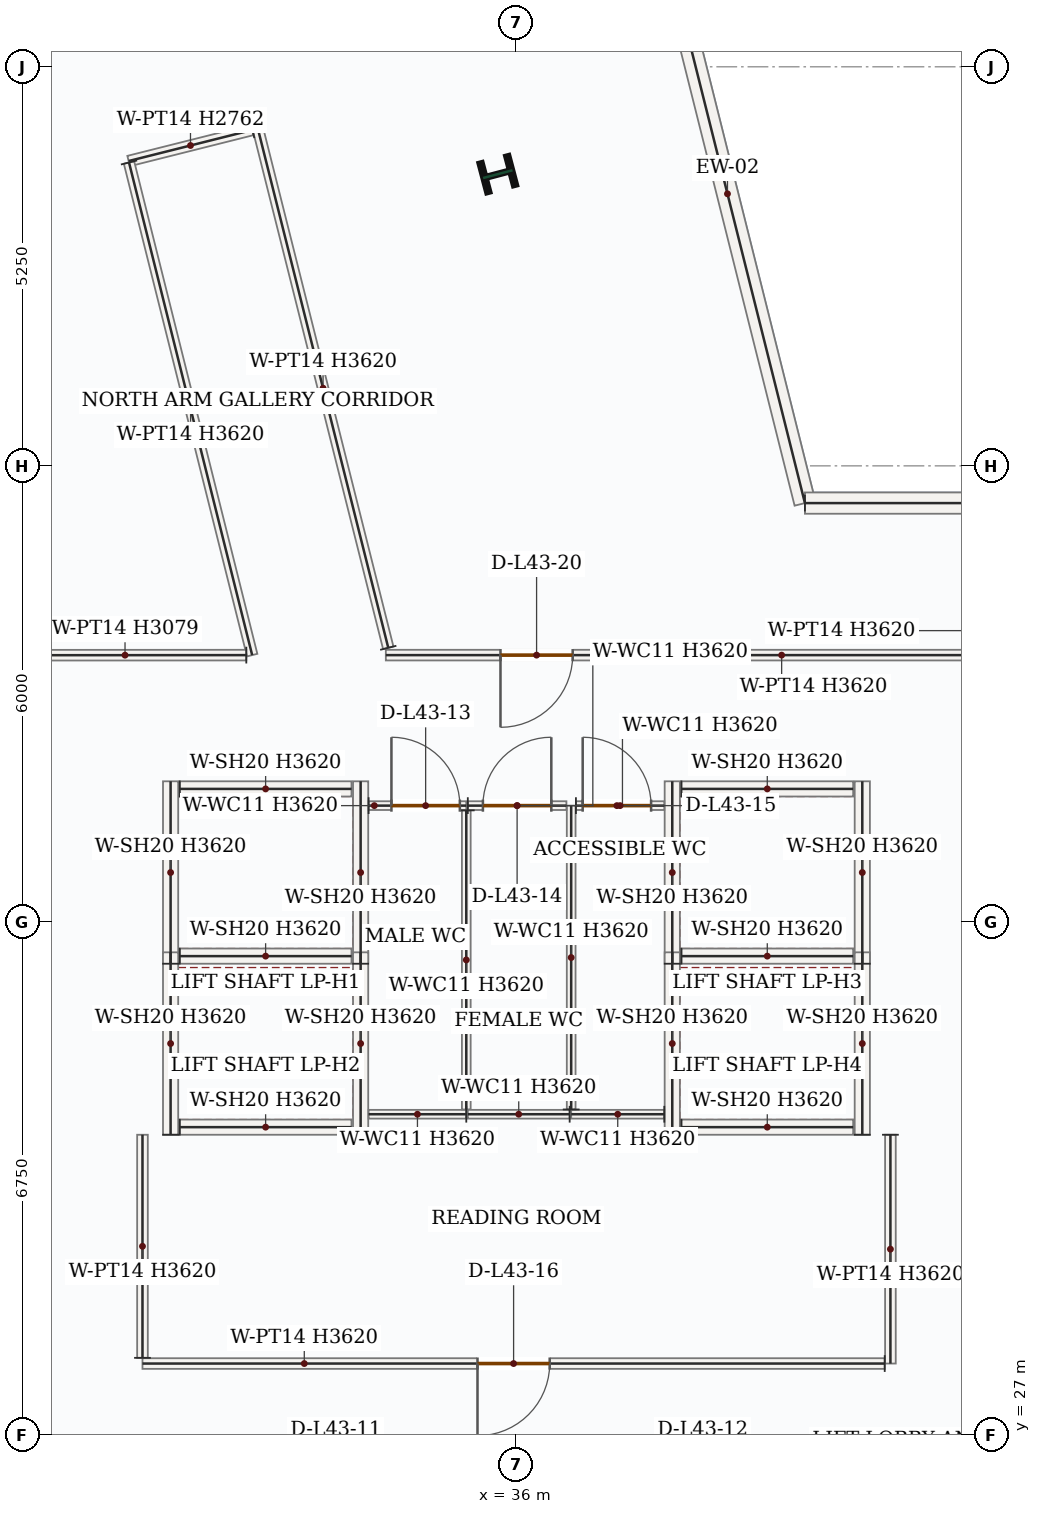
"""IFC4 building model, lengths in metres.
Left out: names, types, materials, properties, quantities, classifications, styles, units other than length and angle.
Written with IfcOpenShell. Run it as: python <this file> out.ifc"""

import sys

from ifc_helpers import new_model, si_unit, direction, frame, frame_2d, origin, origin_2d, place, context, subcontext, project, spatial, rectangle, i_section, extrude, source, transform, mapped, element, fill, save


model = new_model("IFC4")
c1 = context("Model", 3, precision=1e-05, world=origin(), true_north=direction((0.0, 1.0)))
c2 = subcontext(c1, "Body", "Model", "MODEL_VIEW")
j1 = project(units=[si_unit("LENGTHUNIT", "METRE"), si_unit("PLANEANGLEUNIT", "RADIAN")], contexts=[c1])
p1 = place(None, origin())
s1 = spatial("IfcSite", under=j1, at=p1, CompositionType="ELEMENT")
p2 = place(p1, origin())
s2 = spatial("IfcBuilding", under=s1, at=p2, CompositionType="ELEMENT")
p3 = place(p2, frame((0.0, 0.0, 186.3)))
s3 = spatial("IfcBuildingStorey", under=s2, at=p3, CompositionType="ELEMENT", Elevation=186.3)
m1 = source(origin(), c2, "Body", "SweptSolid", [
    extrude(i_section(OverallWidth=0.404, OverallDepth=0.407, WebThickness=0.027, FlangeThickness=0.044, FilletRadius=0.018, at=origin_2d()), origin(), (0.0, 0.0, 1.0), 3.9),
])
p4 = place(p3, frame((35.755, 43.588, 0.0), z_axis=(0.0, 0.0, 1.0), x_axis=(-0.255445757936, 0.966823388604, 0.0)))
e1 = element("IfcColumn", 1, at=p4, inside=s3, PredefinedType="COLUMN", context=c2, shape_type="MappedRepresentation", body=[
    mapped(m1, transform((0.0, 0.0, 0.0), x_axis=(1.0, 0.0, 0.0), y_axis=(0.0, 1.0, 0.0), z_axis=(0.0, 0.0, 1.0), scale=1.0)),
])
m2 = source(origin(), c2, "Body", "SweptSolid", [
    extrude(rectangle(XDim=8.389, YDim=0.28, at=frame_2d((4.195, 0.0))), origin(), (0.0, 0.0, 1.0), 3.62),
])
p5 = place(p3, frame((37.757, 47.398, 0.0), z_axis=(0.0, 0.0, 1.0), x_axis=(0.242939601766, -0.970041416587, 0.0)))
e2 = element("IfcWall", 2, at=p5, inside=s3, PredefinedType="SOLIDWALL", context=c2, shape_type="MappedRepresentation", body=[
    mapped(m2, transform((0.0, 0.0, 0.0), x_axis=(1.0, 0.0, 0.0), y_axis=(0.0, 1.0, 0.0), z_axis=(0.0, 0.0, 1.0), scale=1.0)),
])
m3 = source(origin(), c2, "Body", "SweptSolid", [
    extrude(rectangle(XDim=9.547, YDim=0.28, at=frame_2d((4.773, 0.0))), origin(), (0.0, 0.0, 1.0), 3.62),
])
p6 = place(p3, frame((39.795, 39.26, 0.0), z_axis=(0.0, 0.0, 1.0), x_axis=(1.0, 0.0, 0.0)))
e3 = element("IfcWall", 3, at=p6, inside=s3, PredefinedType="SOLIDWALL", context=c2, shape_type="MappedRepresentation", body=[
    mapped(m3, transform((0.0, 0.0, 0.0), x_axis=(1.0, 0.0, 0.0), y_axis=(0.0, 1.0, 0.0), z_axis=(0.0, 0.0, 1.0), scale=1.0)),
])
m4 = source(origin(), c2, "Body", "SweptSolid", [
    extrude(rectangle(XDim=2.4, YDim=0.2, at=frame_2d((1.2, 0.0))), origin(), (0.0, 0.0, 1.0), 3.62),
])
for number, where, z_axis, x_axis in (
    (4, (31.45, 33.2, 0.0), (0.0, 0.0, 1.0), (0.0, 1.0, 0.0)),
    (5, (33.95, 33.2, 0.0), (0.0, 0.0, 1.0), (0.0, 1.0, 0.0)),
):
    element("IfcWall", number, at=place(p3, frame(where, z_axis=z_axis, x_axis=x_axis)), inside=s3, PredefinedType="SOLIDWALL", context=c2, shape_type="MappedRepresentation", body=[
        mapped(m4, transform((0.0, 0.0, 0.0), x_axis=(1.0, 0.0, 0.0), y_axis=(0.0, 1.0, 0.0), z_axis=(0.0, 0.0, 1.0), scale=1.0)),
    ])
m5 = source(origin(), c2, "Body", "SweptSolid", [
    extrude(rectangle(XDim=2.26, YDim=0.2, at=frame_2d((1.13, 0.0))), origin(), (0.0, 0.0, 1.0), 3.62),
])
for number, where, z_axis, x_axis in (
    (6, (31.57, 33.3, 0.0), (0.0, 0.0, 1.0), (1.0, 0.0, 0.0)),
    (7, (31.57, 35.5, 0.0), (0.0, 0.0, 1.0), (1.0, 0.0, 0.0)),
):
    element("IfcWall", number, at=place(p3, frame(where, z_axis=z_axis, x_axis=x_axis)), inside=s3, PredefinedType="SOLIDWALL", context=c2, shape_type="MappedRepresentation", body=[
        mapped(m5, transform((0.0, 0.0, 0.0), x_axis=(1.0, 0.0, 0.0), y_axis=(0.0, 1.0, 0.0), z_axis=(0.0, 0.0, 1.0), scale=1.0)),
    ])
for number, where, z_axis, x_axis in (
    (8, (31.45, 30.95, 0.0), (0.0, 0.0, 1.0), (0.0, 1.0, 0.0)),
    (9, (33.95, 30.95, 0.0), (0.0, 0.0, 1.0), (0.0, 1.0, 0.0)),
):
    element("IfcWall", number, at=place(p3, frame(where, z_axis=z_axis, x_axis=x_axis)), inside=s3, PredefinedType="SOLIDWALL", context=c2, shape_type="MappedRepresentation", body=[
        mapped(m4, transform((0.0, 0.0, 0.0), x_axis=(1.0, 0.0, 0.0), y_axis=(0.0, 1.0, 0.0), z_axis=(0.0, 0.0, 1.0), scale=1.0)),
    ])
p7 = place(p3, frame((31.57, 31.05, 0.0), z_axis=(0.0, 0.0, 1.0), x_axis=(1.0, 0.0, 0.0)))
e10 = element("IfcWall", 10, at=p7, inside=s3, PredefinedType="SOLIDWALL", context=c2, shape_type="MappedRepresentation", body=[
    mapped(m5, transform((0.0, 0.0, 0.0), x_axis=(1.0, 0.0, 0.0), y_axis=(0.0, 1.0, 0.0), z_axis=(0.0, 0.0, 1.0), scale=1.0)),
])
for number, where, z_axis, x_axis in (
    (11, (38.05, 33.2, 0.0), (0.0, 0.0, 1.0), (0.0, 1.0, 0.0)),
    (12, (40.55, 33.2, 0.0), (0.0, 0.0, 1.0), (0.0, 1.0, 0.0)),
):
    element("IfcWall", number, at=place(p3, frame(where, z_axis=z_axis, x_axis=x_axis)), inside=s3, PredefinedType="SOLIDWALL", context=c2, shape_type="MappedRepresentation", body=[
        mapped(m4, transform((0.0, 0.0, 0.0), x_axis=(1.0, 0.0, 0.0), y_axis=(0.0, 1.0, 0.0), z_axis=(0.0, 0.0, 1.0), scale=1.0)),
    ])
for number, where, z_axis, x_axis in (
    (13, (38.17, 33.3, 0.0), (0.0, 0.0, 1.0), (1.0, 0.0, 0.0)),
    (14, (38.17, 35.5, 0.0), (0.0, 0.0, 1.0), (1.0, 0.0, 0.0)),
):
    element("IfcWall", number, at=place(p3, frame(where, z_axis=z_axis, x_axis=x_axis)), inside=s3, PredefinedType="SOLIDWALL", context=c2, shape_type="MappedRepresentation", body=[
        mapped(m5, transform((0.0, 0.0, 0.0), x_axis=(1.0, 0.0, 0.0), y_axis=(0.0, 1.0, 0.0), z_axis=(0.0, 0.0, 1.0), scale=1.0)),
    ])
for number, where, z_axis, x_axis in (
    (15, (38.05, 30.95, 0.0), (0.0, 0.0, 1.0), (0.0, 1.0, 0.0)),
    (16, (40.55, 30.95, 0.0), (0.0, 0.0, 1.0), (0.0, 1.0, 0.0)),
):
    element("IfcWall", number, at=place(p3, frame(where, z_axis=z_axis, x_axis=x_axis)), inside=s3, PredefinedType="SOLIDWALL", context=c2, shape_type="MappedRepresentation", body=[
        mapped(m4, transform((0.0, 0.0, 0.0), x_axis=(1.0, 0.0, 0.0), y_axis=(0.0, 1.0, 0.0), z_axis=(0.0, 0.0, 1.0), scale=1.0)),
    ])
p8 = place(p3, frame((38.17, 31.05, 0.0), z_axis=(0.0, 0.0, 1.0), x_axis=(1.0, 0.0, 0.0)))
e17 = element("IfcWall", 17, at=p8, inside=s3, PredefinedType="SOLIDWALL", context=c2, shape_type="MappedRepresentation", body=[
    mapped(m5, transform((0.0, 0.0, 0.0), x_axis=(1.0, 0.0, 0.0), y_axis=(0.0, 1.0, 0.0), z_axis=(0.0, 0.0, 1.0), scale=1.0)),
])
m6 = source(origin(), c2, "Body", "SweptSolid", [
    extrude(rectangle(XDim=1.225, YDim=0.115, at=frame_2d((0.613, 0.0))), origin(), (0.0, 0.0, 1.0), 3.62),
])
p9 = place(p3, frame((37.945, 31.22, 0.0), z_axis=(0.0, 0.0, 1.0), x_axis=(-1.0, 0.0, 0.0)))
e18 = element("IfcWall", 18, at=p9, inside=s3, PredefinedType="PARTITIONING", context=c2, shape_type="MappedRepresentation", body=[
    mapped(m6, transform((0.0, 0.0, 0.0), x_axis=(1.0, 0.0, 0.0), y_axis=(0.0, 1.0, 0.0), z_axis=(0.0, 0.0, 1.0), scale=1.0)),
])
m7 = source(origin(), c2, "Body", "SweptSolid", [
    extrude(rectangle(XDim=3.998, YDim=0.115, at=frame_2d((1.999, 0.0))), origin(), (0.0, 0.0, 1.0), 3.62),
])
p10 = place(p3, frame((36.72, 31.282, 0.0), z_axis=(0.0, 0.0, 1.0), x_axis=(0.0, 1.0, 0.0)))
e19 = element("IfcWall", 19, at=p10, inside=s3, PredefinedType="PARTITIONING", context=c2, shape_type="MappedRepresentation", body=[
    mapped(m7, transform((0.0, 0.0, 0.0), x_axis=(1.0, 0.0, 0.0), y_axis=(0.0, 1.0, 0.0), z_axis=(0.0, 0.0, 1.0), scale=1.0)),
])
p11 = place(p3, frame((36.782, 35.28, 0.0), z_axis=(0.0, 0.0, 1.0), x_axis=(1.0, 0.0, 0.0)))
e20 = element("IfcWall", 20, at=p11, inside=s3, PredefinedType="PARTITIONING", context=c2, shape_type="SweptSolid", body=[
    extrude(rectangle(XDim=1.163, YDim=0.115, at=frame_2d((0.581, 0.0))), origin(), (0.0, 0.0, 1.0), 3.62),
])
p12 = place(p11, frame((0.089, 0.0, 0.0)))
e21 = element("IfcOpeningElement", 21, at=p12, cuts=e20, PredefinedType="OPENING", context=c2, shape_type="SweptSolid", body=[
    extrude(rectangle(XDim=0.9, YDim=2.1, at=frame_2d((0.45, 1.05))), frame((0.0, 0.067, 0.0), z_axis=(0.0, -1.0, 0.0), x_axis=(1.0, 0.0, 0.0)), (0.0, 0.0, 1.0), 0.135),
])
m8 = source(origin(), c2, "Body", "SweptSolid", [
    extrude(rectangle(XDim=1.285, YDim=0.115, at=frame_2d((0.643, 0.0))), origin(), (0.0, 0.0, 1.0), 3.62),
])
p13 = place(p3, frame((35.34, 31.22, 0.0), z_axis=(0.0, 0.0, 1.0), x_axis=(-1.0, 0.0, 0.0)))
e22 = element("IfcWall", 22, at=p13, inside=s3, PredefinedType="PARTITIONING", context=c2, shape_type="MappedRepresentation", body=[
    mapped(m8, transform((0.0, 0.0, 0.0), x_axis=(1.0, 0.0, 0.0), y_axis=(0.0, 1.0, 0.0), z_axis=(0.0, 0.0, 1.0), scale=1.0)),
])
p14 = place(p3, frame((34.055, 35.28, 0.0), z_axis=(0.0, 0.0, 1.0), x_axis=(1.0, 0.0, 0.0)))
e23 = element("IfcWall", 23, at=p14, inside=s3, PredefinedType="PARTITIONING", context=c2, shape_type="SweptSolid", body=[
    extrude(rectangle(XDim=1.285, YDim=0.115, at=frame_2d((0.643, 0.0))), origin(), (0.0, 0.0, 1.0), 3.62),
])
p15 = place(p14, frame((0.3, 0.0, 0.0)))
e24 = element("IfcOpeningElement", 24, at=p15, cuts=e23, PredefinedType="OPENING", context=c2, shape_type="SweptSolid", body=[
    extrude(rectangle(XDim=0.9, YDim=2.1, at=frame_2d((0.45, 1.05))), frame((0.0, 0.067, 0.0), z_axis=(0.0, -1.0, 0.0), x_axis=(1.0, 0.0, 0.0)), (0.0, 0.0, 1.0), 0.135),
])
m9 = source(origin(), c2, "Body", "SweptSolid", [
    extrude(rectangle(XDim=3.935, YDim=0.115, at=frame_2d((1.968, 0.0))), origin(), (0.0, 0.0, 1.0), 3.62),
])
p16 = place(p3, frame((35.34, 35.218, 0.0), z_axis=(0.0, 0.0, 1.0), x_axis=(0.0, -1.0, 0.0)))
e25 = element("IfcWall", 25, at=p16, inside=s3, PredefinedType="PARTITIONING", context=c2, shape_type="MappedRepresentation", body=[
    mapped(m9, transform((0.0, 0.0, 0.0), x_axis=(1.0, 0.0, 0.0), y_axis=(0.0, 1.0, 0.0), z_axis=(0.0, 0.0, 1.0), scale=1.0)),
])
m10 = source(origin(), c2, "Body", "SweptSolid", [
    extrude(rectangle(XDim=1.34, YDim=0.115, at=frame_2d((0.67, 0.0))), origin(), (0.0, 0.0, 1.0), 3.62),
])
p17 = place(p3, frame((36.7, 31.22, 0.0), z_axis=(0.0, 0.0, 1.0), x_axis=(-1.0, 0.0, 0.0)))
e26 = element("IfcWall", 26, at=p17, inside=s3, PredefinedType="PARTITIONING", context=c2, shape_type="MappedRepresentation", body=[
    mapped(m10, transform((0.0, 0.0, 0.0), x_axis=(1.0, 0.0, 0.0), y_axis=(0.0, 1.0, 0.0), z_axis=(0.0, 0.0, 1.0), scale=1.0)),
])
p18 = place(p3, frame((35.36, 35.28, 0.0), z_axis=(0.0, 0.0, 1.0), x_axis=(1.0, 0.0, 0.0)))
e27 = element("IfcWall", 27, at=p18, inside=s3, PredefinedType="PARTITIONING", context=c2, shape_type="SweptSolid", body=[
    extrude(rectangle(XDim=1.297, YDim=0.115, at=frame_2d((0.649, 0.0))), origin(), (0.0, 0.0, 1.0), 3.62),
])
p19 = place(p18, frame((0.199, 0.0, 0.0)))
e28 = element("IfcOpeningElement", 28, at=p19, cuts=e27, PredefinedType="OPENING", context=c2, shape_type="SweptSolid", body=[
    extrude(rectangle(XDim=0.9, YDim=2.1, at=frame_2d((0.45, 1.05))), frame((0.0, 0.067, 0.0), z_axis=(0.0, -1.0, 0.0), x_axis=(1.0, 0.0, 0.0)), (0.0, 0.0, 1.0), 0.135),
])
m11 = source(origin(), c2, "Body", "SweptSolid", [
    extrude(rectangle(XDim=3.01, YDim=0.14, at=frame_2d((1.505, 0.0))), origin(), (0.0, 0.0, 1.0), 3.62),
])
p20 = place(p3, frame((40.92, 30.95, 0.0), z_axis=(0.0, 0.0, 1.0), x_axis=(0.0, -1.0, 0.0)))
e29 = element("IfcWall", 29, at=p20, inside=s3, PredefinedType="PARTITIONING", context=c2, shape_type="MappedRepresentation", body=[
    mapped(m11, transform((0.0, 0.0, 0.0), x_axis=(1.0, 0.0, 0.0), y_axis=(0.0, 1.0, 0.0), z_axis=(0.0, 0.0, 1.0), scale=1.0)),
])
p21 = place(p3, frame((40.845, 27.94, 0.0), z_axis=(0.0, 0.0, 1.0), x_axis=(-1.0, 0.0, 0.0)))
e30 = element("IfcWall", 30, at=p21, inside=s3, PredefinedType="PARTITIONING", context=c2, shape_type="SweptSolid", body=[
    extrude(rectangle(XDim=9.765, YDim=0.14, at=frame_2d((4.882, 0.0))), origin(), (0.0, 0.0, 1.0), 3.62),
])
p22 = place(p21, frame((4.407, 0.0, 0.0)))
e31 = element("IfcOpeningElement", 31, at=p22, cuts=e30, PredefinedType="OPENING", context=c2, shape_type="SweptSolid", body=[
    extrude(rectangle(XDim=0.95, YDim=2.15, at=frame_2d((0.475, 1.075))), frame((0.0, 0.08, 0.0), z_axis=(0.0, -1.0, 0.0), x_axis=(1.0, 0.0, 0.0)), (0.0, 0.0, 1.0), 0.16),
])
m12 = source(origin(), c2, "Body", "SweptSolid", [
    extrude(rectangle(XDim=2.935, YDim=0.14, at=frame_2d((1.468, 0.0))), origin(), (0.0, 0.0, 1.0), 3.62),
])
p23 = place(p3, frame((31.08, 28.015, 0.0), z_axis=(0.0, 0.0, 1.0), x_axis=(0.0, 1.0, 0.0)))
e32 = element("IfcWall", 32, at=p23, inside=s3, PredefinedType="PARTITIONING", context=c2, shape_type="MappedRepresentation", body=[
    mapped(m12, transform((0.0, 0.0, 0.0), x_axis=(1.0, 0.0, 0.0), y_axis=(0.0, 1.0, 0.0), z_axis=(0.0, 0.0, 1.0), scale=1.0)),
])
p24 = place(p3, frame((42.088, 37.26, 0.0), z_axis=(0.0, 0.0, 1.0), x_axis=(-1.0, 0.0, 0.0)))
e33 = element("IfcWall", 33, at=p24, inside=s3, PredefinedType="PARTITIONING", context=c2, shape_type="SweptSolid", body=[
    extrude(rectangle(XDim=7.806, YDim=0.14, at=frame_2d((3.903, 0.0))), origin(), (0.0, 0.0, 1.0), 3.62),
])
p25 = place(p24, frame((5.348, 0.0, 0.0)))
e34 = element("IfcOpeningElement", 34, at=p25, cuts=e33, PredefinedType="OPENING", context=c2, shape_type="SweptSolid", body=[
    extrude(rectangle(XDim=0.95, YDim=2.15, at=frame_2d((0.475, 1.075))), frame((0.0, 0.08, 0.0), z_axis=(0.0, -1.0, 0.0), x_axis=(1.0, 0.0, 0.0)), (0.0, 0.0, 1.0), 0.16),
])
m13 = source(origin(), c2, "Body", "SweptSolid", [
    extrude(rectangle(XDim=7.043, YDim=0.14, at=frame_2d((3.521, 0.0))), origin(), (0.0, 0.0, 1.0), 3.62),
])
p26 = place(p3, frame((34.313, 37.356, 0.0), z_axis=(0.0, 0.0, 1.0), x_axis=(-0.243587652837, 0.969878886968, 0.0)))
e35 = element("IfcWall", 35, at=p26, inside=s3, PredefinedType="PARTITIONING", context=c2, shape_type="MappedRepresentation", body=[
    mapped(m13, transform((0.0, 0.0, 0.0), x_axis=(1.0, 0.0, 0.0), y_axis=(0.0, 1.0, 0.0), z_axis=(0.0, 0.0, 1.0), scale=1.0)),
])
m14 = source(origin(), c2, "Body", "SweptSolid", [
    extrude(rectangle(XDim=1.678, YDim=0.14, at=frame_2d((0.839, 0.0))), origin(), (0.0, 0.0, 1.0), 2.762),
])
p27 = place(p3, frame((32.525, 44.169, 0.0), z_axis=(0.0, 0.0, 1.0), x_axis=(-0.969876563393, -0.243596904294, 0.0)))
e36 = element("IfcWall", 36, at=p27, inside=s3, PredefinedType="PARTITIONING", context=c2, shape_type="MappedRepresentation", body=[
    mapped(m14, transform((0.0, 0.0, 0.0), x_axis=(1.0, 0.0, 0.0), y_axis=(0.0, 1.0, 0.0), z_axis=(0.0, 0.0, 1.0), scale=1.0)),
])
m15 = source(origin(), c2, "Body", "SweptSolid", [
    extrude(rectangle(XDim=6.681, YDim=0.14, at=frame_2d((3.34, 0.0))), origin(), (0.0, 0.0, 1.0), 3.62),
])
p28 = place(p3, frame((30.903, 43.741, 0.0), z_axis=(0.0, 0.0, 1.0), x_axis=(0.242544223675, -0.970140350445, 0.0)))
e37 = element("IfcWall", 37, at=p28, inside=s3, PredefinedType="PARTITIONING", context=c2, shape_type="MappedRepresentation", body=[
    mapped(m15, transform((0.0, 0.0, 0.0), x_axis=(1.0, 0.0, 0.0), y_axis=(0.0, 1.0, 0.0), z_axis=(0.0, 0.0, 1.0), scale=1.0)),
])
m16 = source(origin(), c2, "Body", "SweptSolid", [
    extrude(rectangle(XDim=3.191, YDim=0.14, at=frame_2d((1.595, 0.0))), origin(), (0.0, 0.0, 1.0), 3.079),
])
p29 = place(p3, frame((32.446, 37.26, 0.0), z_axis=(0.0, 0.0, 1.0), x_axis=(-0.999999926826, -0.000382555443, 0.0)))
e38 = element("IfcWall", 38, at=p29, inside=s3, PredefinedType="PARTITIONING", context=c2, shape_type="MappedRepresentation", body=[
    mapped(m16, transform((0.0, 0.0, 0.0), x_axis=(1.0, 0.0, 0.0), y_axis=(0.0, 1.0, 0.0), z_axis=(0.0, 0.0, 1.0), scale=1.0)),
])
m17 = source(origin(), c2, "Body", "SweptSolid", [
    extrude(rectangle(XDim=0.9, YDim=2.1, at=frame_2d((0.45, 1.05))), frame((0.0, 0.025, 0.0), z_axis=(0.0, -1.0, 0.0), x_axis=(1.0, 0.0, 0.0)), (0.0, 0.0, 1.0), 0.05),
])
p30 = place(p15, origin())
e39 = element("IfcDoor", 39, at=p30, inside=s3, OperationType="SINGLE_SWING_LEFT", PredefinedType="DOOR", context=c2, shape_type="MappedRepresentation", body=[
    mapped(m17, transform((0.0, 0.0, 0.0), x_axis=(1.0, 0.0, 0.0), y_axis=(0.0, 1.0, 0.0), z_axis=(0.0, 0.0, 1.0), scale=1.0)),
])
fill(e24, e39)
p31 = place(p19, origin())
e40 = element("IfcDoor", 40, at=p31, inside=s3, OperationType="SINGLE_SWING_RIGHT", PredefinedType="DOOR", context=c2, shape_type="MappedRepresentation", body=[
    mapped(m17, transform((0.0, 0.0, 0.0), x_axis=(1.0, 0.0, 0.0), y_axis=(0.0, 1.0, 0.0), z_axis=(0.0, 0.0, 1.0), scale=1.0)),
])
fill(e28, e40)
p32 = place(p12, origin())
e41 = element("IfcDoor", 41, at=p32, inside=s3, OperationType="SINGLE_SWING_LEFT", PredefinedType="DOOR", context=c2, shape_type="MappedRepresentation", body=[
    mapped(m17, transform((0.0, 0.0, 0.0), x_axis=(1.0, 0.0, 0.0), y_axis=(0.0, 1.0, 0.0), z_axis=(0.0, 0.0, 1.0), scale=1.0)),
])
fill(e21, e41)
m18 = source(origin(), c2, "Body", "SweptSolid", [
    extrude(rectangle(XDim=0.95, YDim=2.15, at=frame_2d((0.475, 1.075))), frame((0.0, 0.025, 0.0), z_axis=(0.0, -1.0, 0.0), x_axis=(1.0, 0.0, 0.0)), (0.0, 0.0, 1.0), 0.05),
])
p33 = place(p22, origin())
e42 = element("IfcDoor", 42, at=p33, inside=s3, OperationType="SINGLE_SWING_RIGHT", PredefinedType="DOOR", context=c2, shape_type="MappedRepresentation", body=[
    mapped(m18, transform((0.0, 0.0, 0.0), x_axis=(1.0, 0.0, 0.0), y_axis=(0.0, 1.0, 0.0), z_axis=(0.0, 0.0, 1.0), scale=1.0)),
])
fill(e31, e42)
p34 = place(p25, origin())
e43 = element("IfcDoor", 43, at=p34, inside=s3, OperationType="SINGLE_SWING_RIGHT", PredefinedType="DOOR", context=c2, shape_type="MappedRepresentation", body=[
    mapped(m18, transform((0.0, 0.0, 0.0), x_axis=(1.0, 0.0, 0.0), y_axis=(0.0, 1.0, 0.0), z_axis=(0.0, 0.0, 1.0), scale=1.0)),
])
fill(e34, e43)
save(model, sys.argv[1])
